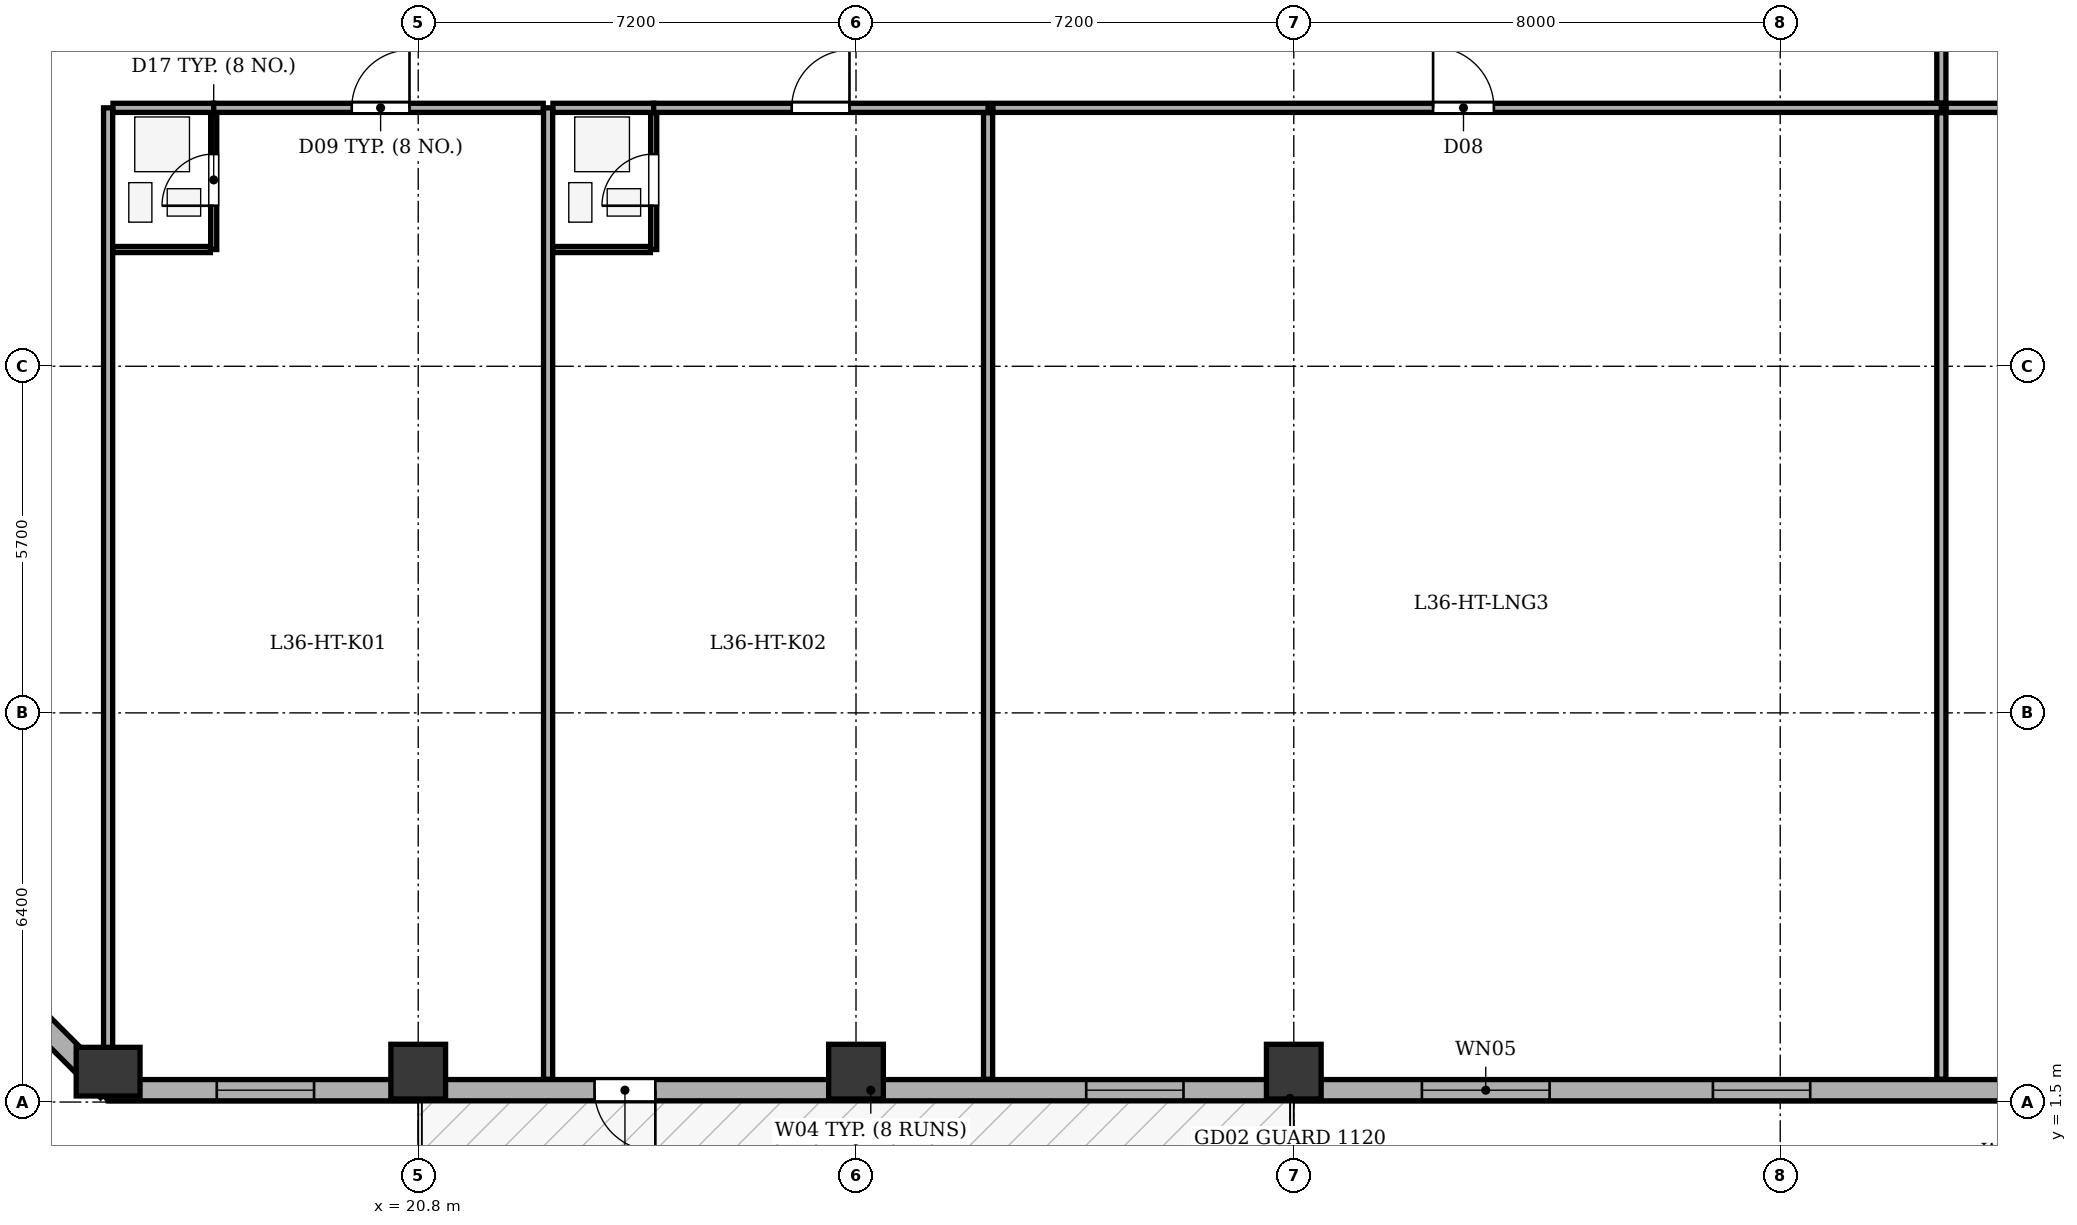
"""IFC4 building model, lengths in metres.
Left out: names, types, materials, properties, quantities, classifications, styles, units other than length and angle.
Written with IfcOpenShell. Run it as: python <this file> out.ifc"""

import sys

from ifc_helpers import new_model, si_unit, direction, frame, frame_2d, origin, origin_2d, place, context, subcontext, project, spatial, rectangle, extrude, element, fill, save


model = new_model("IFC4")
c1 = context("Model", 3, precision=1e-05, world=origin(), true_north=direction((0.0, 1.0)))
c2 = subcontext(c1, "Body", "Model", "MODEL_VIEW")
j1 = project(units=[si_unit("LENGTHUNIT", "METRE"), si_unit("PLANEANGLEUNIT", "RADIAN")], contexts=[c1])
p1 = place(None, origin())
s1 = spatial("IfcSite", under=j1, at=p1, CompositionType="ELEMENT")
p2 = place(p1, origin())
s2 = spatial("IfcBuilding", under=s1, at=p2, CompositionType="ELEMENT")
p3 = place(p2, frame((0.0, 0.0, 144.8)))
s3 = spatial("IfcBuildingStorey", under=s2, at=p3, CompositionType="ELEMENT", Elevation=144.8)
p4 = place(p3, frame((15.7, 2.0, 0.0), z_axis=(0.0, 0.0, 1.0), x_axis=(1.0, 0.0, 0.0)))
e1 = element("IfcColumn", 1, at=p4, inside=s3, PredefinedType="COLUMN", context=c2, shape_type="SweptSolid", body=[
    extrude(rectangle(XDim=0.8, YDim=1.05, at=origin_2d()), origin(), (0.0, 0.0, 1.0), 3.5),
])
for number, where, z_axis, x_axis in (
    (2, (20.8, 2.0, 0.0), (0.0, 0.0, 1.0), (1.0, 0.0, 0.0)),
    (3, (28.0, 2.0, 0.0), (0.0, 0.0, 1.0), (1.0, 0.0, 0.0)),
    (4, (35.2, 2.0, 0.0), (0.0, 0.0, 1.0), (1.0, 0.0, 0.0)),
):
    element("IfcColumn", number, at=place(p3, frame(where, z_axis=z_axis, x_axis=x_axis)), inside=s3, PredefinedType="COLUMN", context=c2, shape_type="SweptSolid", body=[
        extrude(rectangle(XDim=0.9, YDim=0.9, at=origin_2d()), origin(), (0.0, 0.0, 1.0), 3.5),
    ])
p5 = place(p3, frame((50.7, 1.695, 0.0), z_axis=(0.0, 0.0, 1.0), x_axis=(-1.0, 0.0, 0.0)))
e5 = element("IfcWall", 5, at=p5, inside=s3, PredefinedType="STANDARD", context=c2, shape_type="SweptSolid", body=[
    extrude(rectangle(XDim=35.0, YDim=0.35, at=frame_2d((17.5, 0.0))), origin(), (0.0, 0.0, 1.0), 2.785),
])
p6 = place(p5, frame((26.0, 0.0, 0.0)))
e6 = element("IfcOpeningElement", 6, at=p6, cuts=e5, PredefinedType="OPENING", context=c2, shape_type="SweptSolid", body=[
    extrude(rectangle(XDim=1.0, YDim=2.02, at=frame_2d((0.5, 1.01))), frame((0.0, 0.185, 0.0), z_axis=(0.0, -1.0, 0.0), x_axis=(1.0, 0.0, 0.0)), (0.0, 0.0, 1.0), 0.37),
])
p7 = place(p5, frame((1.763, 0.0, 0.75)))
e7 = element("IfcOpeningElement", 7, at=p7, cuts=e5, PredefinedType="OPENING", context=c2, shape_type="SweptSolid", body=[
    extrude(rectangle(XDim=1.6, YDim=1.75, at=frame_2d((0.8, 0.875))), frame((0.0, 0.185, 0.0), z_axis=(0.0, -1.0, 0.0), x_axis=(1.0, 0.0, 0.0)), (0.0, 0.0, 1.0), 0.37),
])
p8 = place(p5, frame((7.007, 0.0, 0.75)))
e8 = element("IfcOpeningElement", 8, at=p8, cuts=e5, PredefinedType="OPENING", context=c2, shape_type="SweptSolid", body=[
    extrude(rectangle(XDim=1.6, YDim=1.75, at=frame_2d((0.8, 0.875))), frame((0.0, 0.185, 0.0), z_axis=(0.0, -1.0, 0.0), x_axis=(1.0, 0.0, 0.0)), (0.0, 0.0, 1.0), 0.37),
])
p9 = place(p5, frame((11.293, 0.0, 0.75)))
e9 = element("IfcOpeningElement", 9, at=p9, cuts=e5, PredefinedType="OPENING", context=c2, shape_type="SweptSolid", body=[
    extrude(rectangle(XDim=2.1, YDim=1.75, at=frame_2d((1.05, 0.875))), frame((0.0, 0.185, 0.0), z_axis=(0.0, -1.0, 0.0), x_axis=(1.0, 0.0, 0.0)), (0.0, 0.0, 1.0), 0.37),
])
p10 = place(p5, frame((17.314, 0.0, 0.75)))
e10 = element("IfcOpeningElement", 10, at=p10, cuts=e5, PredefinedType="OPENING", context=c2, shape_type="SweptSolid", body=[
    extrude(rectangle(XDim=1.6, YDim=1.75, at=frame_2d((0.8, 0.875))), frame((0.0, 0.185, 0.0), z_axis=(0.0, -1.0, 0.0), x_axis=(1.0, 0.0, 0.0)), (0.0, 0.0, 1.0), 0.37),
])
p11 = place(p5, frame((31.613, 0.0, 0.75)))
e11 = element("IfcOpeningElement", 11, at=p11, cuts=e5, PredefinedType="OPENING", context=c2, shape_type="SweptSolid", body=[
    extrude(rectangle(XDim=1.6, YDim=1.75, at=frame_2d((0.8, 0.875))), frame((0.0, 0.185, 0.0), z_axis=(0.0, -1.0, 0.0), x_axis=(1.0, 0.0, 0.0)), (0.0, 0.0, 1.0), 0.37),
])
p12 = place(p3, frame((15.7, 1.695, 0.0), z_axis=(0.0, 0.0, 1.0), x_axis=(-0.707106781187, 0.707106781187, 0.0)))
e12 = element("IfcWall", 12, at=p12, inside=s3, PredefinedType="STANDARD", context=c2, shape_type="SweptSolid", body=[
    extrude(rectangle(XDim=6.795, YDim=0.35, at=frame_2d((3.397, 0.0))), origin(), (0.0, 0.0, 1.0), 2.785),
])
p13 = place(p12, frame((2.698, 0.0, 0.75)))
e13 = element("IfcOpeningElement", 13, at=p13, cuts=e12, PredefinedType="OPENING", context=c2, shape_type="SweptSolid", body=[
    extrude(rectangle(XDim=1.4, YDim=1.65, at=frame_2d((0.7, 0.825))), frame((0.0, 0.185, 0.0), z_axis=(0.0, -1.0, 0.0), x_axis=(1.0, 0.0, 0.0)), (0.0, 0.0, 1.0), 0.37),
])
for number, where, z_axis, x_axis in (
    (14, (15.7, 1.875, 0.0), (0.0, 0.0, 1.0), (0.0, 1.0, 0.0)),
    (15, (22.936, 1.875, 0.0), (0.0, 0.0, 1.0), (0.0, 1.0, 0.0)),
):
    element("IfcWall", number, at=place(p3, frame(where, z_axis=z_axis, x_axis=x_axis)), inside=s3, PredefinedType="PARTITIONING", context=c2, shape_type="SweptSolid", body=[
        extrude(rectangle(XDim=15.975, YDim=0.15, at=frame_2d((7.988, 0.0))), origin(), (0.0, 0.0, 1.0), 3.2),
    ])
p14 = place(p3, frame((15.78, 17.85, 0.0), z_axis=(0.0, 0.0, 1.0), x_axis=(1.0, 0.0, 0.0)))
e16 = element("IfcWall", 16, at=p14, inside=s3, PredefinedType="PARTITIONING", context=c2, shape_type="SweptSolid", body=[
    extrude(rectangle(XDim=1.656, YDim=0.15, at=frame_2d((0.828, 0.0))), origin(), (0.0, 0.0, 1.0), 3.2),
])
p15 = place(p3, frame((17.437, 17.85, 0.0), z_axis=(0.0, 0.0, 1.0), x_axis=(1.0, 0.0, 0.0)))
e17 = element("IfcWall", 17, at=p15, inside=s3, PredefinedType="PARTITIONING", context=c2, shape_type="SweptSolid", body=[
    extrude(rectangle(XDim=5.419, YDim=0.15, at=frame_2d((2.71, 0.0))), origin(), (0.0, 0.0, 1.0), 3.2),
])
p16 = place(p15, frame((2.27, 0.0, 0.0)))
e18 = element("IfcOpeningElement", 18, at=p16, cuts=e17, PredefinedType="OPENING", context=c2, shape_type="SweptSolid", body=[
    extrude(rectangle(XDim=0.95, YDim=2.1, at=frame_2d((0.475, 1.05))), frame((0.0, 0.085, 0.0), z_axis=(0.0, -1.0, 0.0), x_axis=(1.0, 0.0, 0.0)), (0.0, 0.0, 1.0), 0.17),
])
p17 = place(p3, frame((17.437, 15.52, 0.0), z_axis=(0.0, 0.0, 1.0), x_axis=(0.0, 1.0, 0.0)))
e19 = element("IfcWall", 19, at=p17, inside=s3, PredefinedType="PARTITIONING", context=c2, shape_type="SweptSolid", body=[
    extrude(rectangle(XDim=2.25, YDim=0.1, at=frame_2d((1.125, 0.0))), origin(), (0.0, 0.0, 1.0), 3.2),
])
p18 = place(p17, frame((0.72, 0.0, 0.0)))
e20 = element("IfcOpeningElement", 20, at=p18, cuts=e19, PredefinedType="OPENING", context=c2, shape_type="SweptSolid", body=[
    extrude(rectangle(XDim=0.85, YDim=2.05, at=frame_2d((0.425, 1.025))), frame((0.0, 0.06, 0.0), z_axis=(0.0, -1.0, 0.0), x_axis=(1.0, 0.0, 0.0)), (0.0, 0.0, 1.0), 0.12),
])
p19 = place(p3, frame((15.78, 15.52, 0.0), z_axis=(0.0, 0.0, 1.0), x_axis=(1.0, 0.0, 0.0)))
e21 = element("IfcWall", 21, at=p19, inside=s3, PredefinedType="PARTITIONING", context=c2, shape_type="SweptSolid", body=[
    extrude(rectangle(XDim=1.602, YDim=0.1, at=frame_2d((0.801, 0.0))), origin(), (0.0, 0.0, 1.0), 3.2),
])
p20 = place(p3, frame((23.016, 17.85, 0.0), z_axis=(0.0, 0.0, 1.0), x_axis=(1.0, 0.0, 0.0)))
e22 = element("IfcWall", 22, at=p20, inside=s3, PredefinedType="PARTITIONING", context=c2, shape_type="SweptSolid", body=[
    extrude(rectangle(XDim=1.656, YDim=0.15, at=frame_2d((0.828, 0.0))), origin(), (0.0, 0.0, 1.0), 3.2),
])
p21 = place(p3, frame((24.673, 17.85, 0.0), z_axis=(0.0, 0.0, 1.0), x_axis=(1.0, 0.0, 0.0)))
e23 = element("IfcWall", 23, at=p21, inside=s3, PredefinedType="PARTITIONING", context=c2, shape_type="SweptSolid", body=[
    extrude(rectangle(XDim=5.5, YDim=0.15, at=frame_2d((2.75, 0.0))), origin(), (0.0, 0.0, 1.0), 3.2),
])
p22 = place(p21, frame((2.27, 0.0, 0.0)))
e24 = element("IfcOpeningElement", 24, at=p22, cuts=e23, PredefinedType="OPENING", context=c2, shape_type="SweptSolid", body=[
    extrude(rectangle(XDim=0.95, YDim=2.1, at=frame_2d((0.475, 1.05))), frame((0.0, 0.085, 0.0), z_axis=(0.0, -1.0, 0.0), x_axis=(1.0, 0.0, 0.0)), (0.0, 0.0, 1.0), 0.17),
])
p23 = place(p3, frame((24.673, 15.52, 0.0), z_axis=(0.0, 0.0, 1.0), x_axis=(0.0, 1.0, 0.0)))
e25 = element("IfcWall", 25, at=p23, inside=s3, PredefinedType="PARTITIONING", context=c2, shape_type="SweptSolid", body=[
    extrude(rectangle(XDim=2.25, YDim=0.1, at=frame_2d((1.125, 0.0))), origin(), (0.0, 0.0, 1.0), 3.2),
])
p24 = place(p23, frame((0.72, 0.0, 0.0)))
e26 = element("IfcOpeningElement", 26, at=p24, cuts=e25, PredefinedType="OPENING", context=c2, shape_type="SweptSolid", body=[
    extrude(rectangle(XDim=0.85, YDim=2.05, at=frame_2d((0.425, 1.025))), frame((0.0, 0.06, 0.0), z_axis=(0.0, -1.0, 0.0), x_axis=(1.0, 0.0, 0.0)), (0.0, 0.0, 1.0), 0.12),
])
p25 = place(p3, frame((23.016, 15.52, 0.0), z_axis=(0.0, 0.0, 1.0), x_axis=(1.0, 0.0, 0.0)))
e27 = element("IfcWall", 27, at=p25, inside=s3, PredefinedType="PARTITIONING", context=c2, shape_type="SweptSolid", body=[
    extrude(rectangle(XDim=1.602, YDim=0.1, at=frame_2d((0.801, 0.0))), origin(), (0.0, 0.0, 1.0), 3.2),
])
p26 = place(p3, frame((30.172, 1.875, 0.0), z_axis=(0.0, 0.0, 1.0), x_axis=(0.0, 1.0, 0.0)))
e28 = element("IfcWall", 28, at=p26, inside=s3, PredefinedType="PARTITIONING", context=c2, shape_type="SweptSolid", body=[
    extrude(rectangle(XDim=15.895, YDim=0.15, at=frame_2d((7.948, 0.0))), origin(), (0.0, 0.0, 1.0), 3.2),
])
p27 = place(p3, frame((30.252, 17.85, 0.0), z_axis=(0.0, 0.0, 1.0), x_axis=(1.0, 0.0, 0.0)))
e29 = element("IfcWall", 29, at=p27, inside=s3, PredefinedType="PARTITIONING", context=c2, shape_type="SweptSolid", body=[
    extrude(rectangle(XDim=15.598, YDim=0.15, at=frame_2d((7.799, 0.0))), origin(), (0.0, 0.0, 1.0), 3.2),
])
p28 = place(p27, frame((7.239, 0.0, 0.0)))
e30 = element("IfcOpeningElement", 30, at=p28, cuts=e29, PredefinedType="OPENING", context=c2, shape_type="SweptSolid", body=[
    extrude(rectangle(XDim=1.0, YDim=2.1, at=frame_2d((0.5, 1.05))), frame((0.0, 0.085, 0.0), z_axis=(0.0, -1.0, 0.0), x_axis=(1.0, 0.0, 0.0)), (0.0, 0.0, 1.0), 0.17),
])
p29 = place(p3, frame((45.85, 1.875, 0.0), z_axis=(0.0, 0.0, 1.0), x_axis=(0.0, 1.0, 0.0)))
e31 = element("IfcWall", 31, at=p29, inside=s3, PredefinedType="PARTITIONING", context=c2, shape_type="SweptSolid", body=[
    extrude(rectangle(XDim=15.895, YDim=0.15, at=frame_2d((7.948, 0.0))), origin(), (0.0, 0.0, 1.0), 3.2),
])
p30 = place(p3, frame((45.93, 17.85, 0.0), z_axis=(0.0, 0.0, 1.0), x_axis=(1.0, 0.0, 0.0)))
e32 = element("IfcWall", 32, at=p30, inside=s3, PredefinedType="PARTITIONING", context=c2, shape_type="SweptSolid", body=[
    extrude(rectangle(XDim=9.395, YDim=0.15, at=frame_2d((4.698, 0.0))), origin(), (0.0, 0.0, 1.0), 3.2),
])
p31 = place(p3, frame((45.85, 17.93, 0.0), z_axis=(0.0, 0.0, 1.0), x_axis=(0.0, 1.0, 0.0)))
e33 = element("IfcWall", 33, at=p31, inside=s3, PredefinedType="PARTITIONING", context=c2, shape_type="SweptSolid", body=[
    extrude(rectangle(XDim=18.54, YDim=0.15, at=frame_2d((9.27, 0.0))), origin(), (0.0, 0.0, 1.0), 3.2),
])
p32 = place(p31, frame((8.79, 0.0, 0.0)))
e34 = element("IfcOpeningElement", 34, at=p32, cuts=e33, PredefinedType="OPENING", context=c2, shape_type="SweptSolid", body=[
    extrude(rectangle(XDim=0.95, YDim=2.1, at=frame_2d((0.475, 1.05))), frame((0.0, 0.085, 0.0), z_axis=(0.0, -1.0, 0.0), x_axis=(1.0, 0.0, 0.0)), (0.0, 0.0, 1.0), 0.17),
])
p33 = place(p6, origin())
e35 = element("IfcDoor", 35, at=p33, inside=s3, OperationType="SINGLE_SWING_LEFT", PredefinedType="DOOR", context=c2, shape_type="SweptSolid", body=[
    extrude(rectangle(XDim=1.0, YDim=2.02, at=frame_2d((0.5, 1.01))), frame((0.0, 0.025, 0.0), z_axis=(0.0, -1.0, 0.0), x_axis=(1.0, 0.0, 0.0)), (0.0, 0.0, 1.0), 0.05),
])
fill(e6, e35)
p34 = place(p8, origin())
e36 = element("IfcWindow", 36, at=p34, inside=s3, PartitioningType="SINGLE_PANEL", PredefinedType="WINDOW", context=c2, shape_type="SweptSolid", body=[
    extrude(rectangle(XDim=1.6, YDim=1.75, at=frame_2d((0.8, 0.875))), frame((0.0, -0.01, 0.0), z_axis=(0.0, -1.0, 0.0), x_axis=(1.0, 0.0, 0.0)), (0.0, 0.0, 1.0), 0.06),
])
fill(e8, e36)
p35 = place(p9, origin())
e37 = element("IfcWindow", 37, at=p35, inside=s3, PartitioningType="SINGLE_PANEL", PredefinedType="WINDOW", context=c2, shape_type="SweptSolid", body=[
    extrude(rectangle(XDim=2.1, YDim=1.75, at=frame_2d((1.05, 0.875))), frame((0.0, -0.01, 0.0), z_axis=(0.0, -1.0, 0.0), x_axis=(1.0, 0.0, 0.0)), (0.0, 0.0, 1.0), 0.06),
])
fill(e9, e37)
p36 = place(p10, origin())
e38 = element("IfcWindow", 38, at=p36, inside=s3, PartitioningType="SINGLE_PANEL", PredefinedType="WINDOW", context=c2, shape_type="SweptSolid", body=[
    extrude(rectangle(XDim=1.6, YDim=1.75, at=frame_2d((0.8, 0.875))), frame((0.0, -0.01, 0.0), z_axis=(0.0, -1.0, 0.0), x_axis=(1.0, 0.0, 0.0)), (0.0, 0.0, 1.0), 0.06),
])
fill(e10, e38)
p37 = place(p11, origin())
e39 = element("IfcWindow", 39, at=p37, inside=s3, PartitioningType="SINGLE_PANEL", PredefinedType="WINDOW", context=c2, shape_type="SweptSolid", body=[
    extrude(rectangle(XDim=1.6, YDim=1.75, at=frame_2d((0.8, 0.875))), frame((0.0, -0.01, 0.0), z_axis=(0.0, -1.0, 0.0), x_axis=(1.0, 0.0, 0.0)), (0.0, 0.0, 1.0), 0.06),
])
fill(e11, e39)
p38 = place(p18, origin())
e40 = element("IfcDoor", 40, at=p38, inside=s3, OperationType="SINGLE_SWING_LEFT", PredefinedType="DOOR", context=c2, shape_type="SweptSolid", body=[
    extrude(rectangle(XDim=0.85, YDim=2.05, at=frame_2d((0.425, 1.025))), frame((0.0, 0.025, 0.0), z_axis=(0.0, -1.0, 0.0), x_axis=(1.0, 0.0, 0.0)), (0.0, 0.0, 1.0), 0.05),
])
fill(e20, e40)
p39 = place(p16, origin())
e41 = element("IfcDoor", 41, at=p39, inside=s3, OperationType="SINGLE_SWING_RIGHT", PredefinedType="DOOR", context=c2, shape_type="SweptSolid", body=[
    extrude(rectangle(XDim=0.95, YDim=2.1, at=frame_2d((0.475, 1.05))), frame((0.0, 0.025, 0.0), z_axis=(0.0, -1.0, 0.0), x_axis=(1.0, 0.0, 0.0)), (0.0, 0.0, 1.0), 0.05),
])
fill(e18, e41)
p40 = place(p24, origin())
e42 = element("IfcDoor", 42, at=p40, inside=s3, OperationType="SINGLE_SWING_LEFT", PredefinedType="DOOR", context=c2, shape_type="SweptSolid", body=[
    extrude(rectangle(XDim=0.85, YDim=2.05, at=frame_2d((0.425, 1.025))), frame((0.0, 0.025, 0.0), z_axis=(0.0, -1.0, 0.0), x_axis=(1.0, 0.0, 0.0)), (0.0, 0.0, 1.0), 0.05),
])
fill(e26, e42)
p41 = place(p22, origin())
e43 = element("IfcDoor", 43, at=p41, inside=s3, OperationType="SINGLE_SWING_RIGHT", PredefinedType="DOOR", context=c2, shape_type="SweptSolid", body=[
    extrude(rectangle(XDim=0.95, YDim=2.1, at=frame_2d((0.475, 1.05))), frame((0.0, 0.025, 0.0), z_axis=(0.0, -1.0, 0.0), x_axis=(1.0, 0.0, 0.0)), (0.0, 0.0, 1.0), 0.05),
])
fill(e24, e43)
p42 = place(p28, origin())
e44 = element("IfcDoor", 44, at=p42, inside=s3, OperationType="SINGLE_SWING_LEFT", PredefinedType="DOOR", context=c2, shape_type="SweptSolid", body=[
    extrude(rectangle(XDim=1.0, YDim=2.1, at=frame_2d((0.5, 1.05))), frame((0.0, 0.025, 0.0), z_axis=(0.0, -1.0, 0.0), x_axis=(1.0, 0.0, 0.0)), (0.0, 0.0, 1.0), 0.05),
])
fill(e30, e44)
save(model, sys.argv[1])
